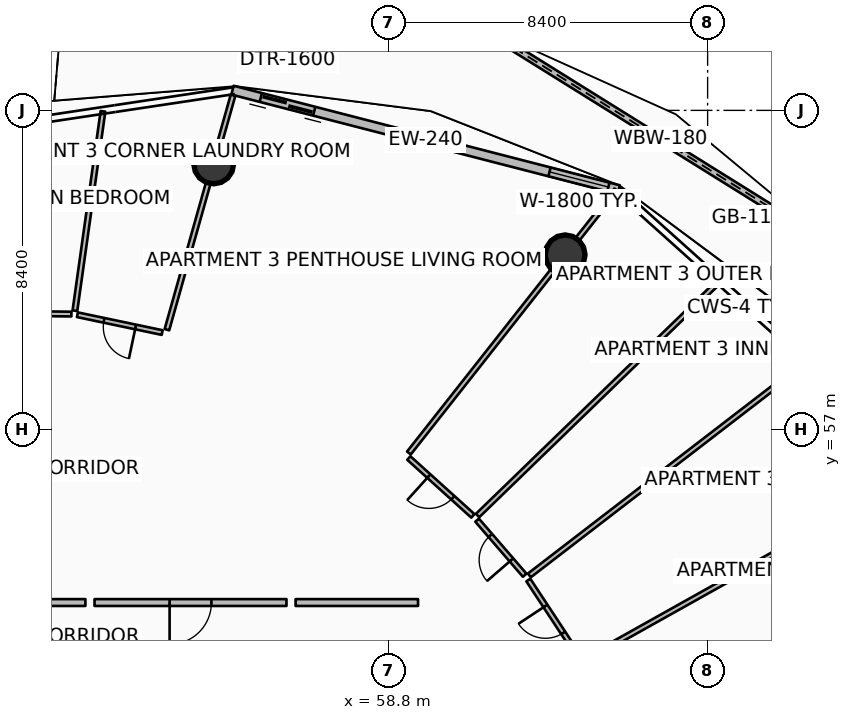
"""IFC4 building model, lengths in metres.
Left out: names, types, materials, properties, quantities, classifications, styles, units other than length and angle.
Written with IfcOpenShell. Run it as: python <this file> out.ifc"""

import sys

from ifc_helpers import new_model, si_unit, direction, frame, frame_2d, origin, origin_2d, place, context, subcontext, project, spatial, polyline, rectangle, circle, outline, extrude, element, fill, save


model = new_model("IFC4")
c1 = context("Model", 3, precision=1e-05, world=origin(), true_north=direction((0.0, 1.0)))
c2 = subcontext(c1, "Body", "Model", "MODEL_VIEW")
j1 = project(units=[si_unit("LENGTHUNIT", "METRE"), si_unit("PLANEANGLEUNIT", "RADIAN")], contexts=[c1])
p1 = place(None, origin())
s1 = spatial("IfcSite", under=j1, at=p1, CompositionType="ELEMENT")
p2 = place(p1, origin())
s2 = spatial("IfcBuilding", under=s1, at=p2, CompositionType="ELEMENT")
p3 = place(p2, frame((0.0, 0.0, 221.55)))
s3 = spatial("IfcBuildingStorey", under=s2, at=p3, CompositionType="ELEMENT", Elevation=221.55)
p4 = place(p3, frame((63.451, 61.599, 0.0), z_axis=(0.178277097361, 0.226248863544, 0.957616169612), x_axis=(-0.785457214564, 0.618915958826, 0.0)))
e1 = element("IfcColumn", 1, at=p4, inside=s3, PredefinedType="COLUMN", context=c2, shape_type="SweptSolid", body=[
    extrude(circle(Radius=0.525, at=origin_2d()), origin(), (0.0, 0.0, 1.0), 3.624),
])
p5 = place(p3, frame((54.202, 63.992, 0.0), z_axis=(0.072038916576, 0.255527870756, 0.964114050186), x_axis=(-0.962482190553, 0.271344859667, 0.0)))
e2 = element("IfcColumn", 2, at=p5, inside=s3, PredefinedType="COLUMN", context=c2, shape_type="SweptSolid", body=[
    extrude(circle(Radius=0.525, at=origin_2d()), origin(), (0.0, 0.0, 1.0), 3.599),
])
p6 = place(p3, frame((70.74, 61.664, 0.0), z_axis=(0.0, 0.0, 1.0), x_axis=(-0.84875531388, 0.528785795158, 0.0)))
e3 = element("IfcWall", 3, at=p6, inside=s3, PredefinedType="PARAPET", context=c2, shape_type="SweptSolid", body=[
    extrude(outline(polyline([(0.0, 0.0), (11.257, 0.0), (11.257, 1.832), (5.628, 1.696), (0.0, 1.497), (0.0, 0.0)])), frame((0.0, 0.09, 0.0), z_axis=(0.0, -1.0, 0.0), x_axis=(1.0, 0.0, 0.0)), (0.0, 0.0, 1.0), 0.18),
])
p7 = place(p3, frame((64.86, 63.313, 0.0), z_axis=(0.0, 0.0, 1.0), x_axis=(-0.968374028006, 0.249502989727, 0.0)))
e4 = element("IfcWall", 4, at=p7, inside=s3, PredefinedType="SOLIDWALL", context=c2, shape_type="SweptSolid", body=[
    extrude(rectangle(XDim=10.494, YDim=0.24, at=frame_2d((5.247, 0.0))), origin(), (0.0, 0.0, 1.0), 2.42),
])
p8 = place(p7, frame((8.274, 0.0, 0.0)))
e5 = element("IfcOpeningElement", 5, at=p8, cuts=e4, PredefinedType="OPENING", context=c2, shape_type="SweptSolid", body=[
    extrude(rectangle(XDim=1.45, YDim=2.15, at=frame_2d((0.725, 1.075))), frame((0.0, 0.13, 0.0), z_axis=(0.0, -1.0, 0.0), x_axis=(1.0, 0.0, 0.0)), (0.0, 0.0, 1.0), 0.26),
])
p9 = place(p7, frame((0.28, 0.0, 0.65)))
e6 = element("IfcOpeningElement", 6, at=p9, cuts=e4, PredefinedType="OPENING", context=c2, shape_type="SweptSolid", body=[
    extrude(rectangle(XDim=1.6, YDim=1.5, at=frame_2d((0.8, 0.75))), frame((0.0, 0.13, 0.0), z_axis=(0.0, -1.0, 0.0), x_axis=(1.0, 0.0, 0.0)), (0.0, 0.0, 1.0), 0.26),
])
p10 = place(p3, frame((56.118, 52.45, 0.0), z_axis=(0.0, 0.0, 1.0), x_axis=(-1.0, 0.0, 0.0)))
e7 = element("IfcWall", 7, at=p10, inside=s3, PredefinedType="PARTITIONING", context=c2, shape_type="SweptSolid", body=[
    extrude(rectangle(XDim=5.051, YDim=0.18, at=frame_2d((2.525, 0.0))), origin(), (0.0, 0.0, 1.0), 2.427),
])
p11 = place(p10, frame((1.975, 0.0, 0.0)))
e8 = element("IfcOpeningElement", 8, at=p11, cuts=e7, PredefinedType="OPENING", context=c2, shape_type="SweptSolid", body=[
    extrude(rectangle(XDim=1.1, YDim=2.1, at=frame_2d((0.55, 1.05))), frame((0.0, 0.1, 0.0), z_axis=(0.0, -1.0, 0.0), x_axis=(1.0, 0.0, 0.0)), (0.0, 0.0, 1.0), 0.2),
])
p12 = place(p3, frame((65.019, 48.746, 0.0), z_axis=(0.0, 0.0, 1.0), x_axis=(0.929640612561, 0.368467544672, 0.0)))
e9 = element("IfcWall", 9, at=p12, inside=s3, PredefinedType="PARTITIONING", context=c2, shape_type="SweptSolid", body=[
    extrude(rectangle(XDim=9.106, YDim=0.125, at=frame_2d((4.553, 0.0))), origin(), (0.0, 0.0, 1.0), 2.445),
])
p13 = place(p3, frame((59.58, 52.45, 0.0), z_axis=(0.0, 0.0, 1.0), x_axis=(-1.0, 0.0, 0.0)))
e10 = element("IfcWall", 10, at=p13, inside=s3, PredefinedType="PARTITIONING", context=c2, shape_type="SweptSolid", body=[
    extrude(rectangle(XDim=3.222, YDim=0.18, at=frame_2d((1.611, 0.0))), origin(), (0.0, 0.0, 1.0), 2.427),
])
p14 = place(p3, frame((63.981, 50.95, 0.0), z_axis=(0.0, 0.0, 1.0), x_axis=(0.872503842663, 0.488607249781, 0.0)))
e11 = element("IfcWall", 11, at=p14, inside=s3, PredefinedType="PARTITIONING", context=c2, shape_type="SweptSolid", body=[
    extrude(rectangle(XDim=9.578, YDim=0.125, at=frame_2d((4.789, 0.0))), origin(), (0.0, 0.0, 1.0), 2.427),
])
p15 = place(p3, frame((59.34, 56.385, 0.0), z_axis=(0.0, 0.0, 1.0), x_axis=(0.619088176329, 0.785321481897, 0.0)))
e12 = element("IfcWall", 12, at=p15, inside=s3, PredefinedType="PARTITIONING", context=c2, shape_type="SweptSolid", body=[
    extrude(rectangle(XDim=8.813, YDim=0.125, at=frame_2d((4.407, 0.0))), origin(), (0.0, 0.0, 1.0), 2.427),
])
p16 = place(p3, frame((62.509, 53.164, 0.0), z_axis=(0.0, 0.0, 1.0), x_axis=(0.792555170496, 0.609800214595, 0.0)))
e13 = element("IfcWall", 13, at=p16, inside=s3, PredefinedType="PARTITIONING", context=c2, shape_type="SweptSolid", body=[
    extrude(rectangle(XDim=9.232, YDim=0.125, at=frame_2d((4.616, 0.0))), origin(), (0.0, 0.0, 1.0), 2.445),
])
p17 = place(p3, frame((61.147, 54.74, 0.0), z_axis=(0.0, 0.0, 1.0), x_axis=(0.718115054564, 0.695924398487, 0.0)))
e14 = element("IfcWall", 14, at=p17, inside=s3, PredefinedType="PARTITIONING", context=c2, shape_type="SweptSolid", body=[
    extrude(rectangle(XDim=8.834, YDim=0.125, at=frame_2d((4.417, 0.0))), origin(), (0.0, 0.0, 1.0), 2.445),
])
p18 = place(p3, frame((63.85, 50.968, 0.0), z_axis=(0.0, 0.0, 1.0), x_axis=(-0.550588918003, 0.834776523012, 0.0)))
e15 = element("IfcWall", 15, at=p18, inside=s3, PredefinedType="PARTITIONING", context=c2, shape_type="SweptSolid", body=[
    extrude(rectangle(XDim=2.484, YDim=0.125, at=frame_2d((1.242, 0.0))), origin(), (0.0, 0.0, 1.0), 2.427),
])
p19 = place(p18, frame((0.817, 0.0, 0.0)))
e16 = element("IfcOpeningElement", 16, at=p19, cuts=e15, PredefinedType="OPENING", context=c2, shape_type="SweptSolid", body=[
    extrude(rectangle(XDim=0.85, YDim=2.06, at=frame_2d((0.425, 1.03))), frame((0.0, 0.073, 0.0), z_axis=(0.0, -1.0, 0.0), x_axis=(1.0, 0.0, 0.0)), (0.0, 0.0, 1.0), 0.145),
])
p20 = place(p3, frame((62.386, 53.169, 0.0), z_axis=(0.0, 0.0, 1.0), x_axis=(-0.653885574284, 0.756593454732, 0.0)))
e17 = element("IfcWall", 17, at=p20, inside=s3, PredefinedType="PARTITIONING", context=c2, shape_type="SweptSolid", body=[
    extrude(rectangle(XDim=1.914, YDim=0.125, at=frame_2d((0.957, 0.0))), origin(), (0.0, 0.0, 1.0), 2.91),
])
p21 = place(p20, frame((0.532, 0.0, 0.0)))
e18 = element("IfcOpeningElement", 18, at=p21, cuts=e17, PredefinedType="OPENING", context=c2, shape_type="SweptSolid", body=[
    extrude(rectangle(XDim=0.85, YDim=2.06, at=frame_2d((0.425, 1.03))), frame((0.0, 0.073, 0.0), z_axis=(0.0, -1.0, 0.0), x_axis=(1.0, 0.0, 0.0)), (0.0, 0.0, 1.0), 0.145),
])
p22 = place(p3, frame((61.023, 54.731, 0.0), z_axis=(0.0, 0.0, 1.0), x_axis=(-0.742261355739, 0.670110498184, 0.0)))
e19 = element("IfcWall", 19, at=p22, inside=s3, PredefinedType="PARTITIONING", context=c2, shape_type="SweptSolid", body=[
    extrude(rectangle(XDim=2.271, YDim=0.125, at=frame_2d((1.135, 0.0))), origin(), (0.0, 0.0, 1.0), 2.427),
])
p23 = place(p22, frame((0.71, 0.0, 0.0)))
e20 = element("IfcOpeningElement", 20, at=p23, cuts=e19, PredefinedType="OPENING", context=c2, shape_type="SweptSolid", body=[
    extrude(rectangle(XDim=0.85, YDim=2.06, at=frame_2d((0.425, 1.03))), frame((0.0, 0.073, 0.0), z_axis=(0.0, -1.0, 0.0), x_axis=(1.0, 0.0, 0.0)), (0.0, 0.0, 1.0), 0.145),
])
p24 = place(p3, frame((50.827, 52.45, 0.0), z_axis=(0.0, 0.0, 1.0), x_axis=(-1.0, 0.0, 0.0)))
e21 = element("IfcWall", 21, at=p24, inside=s3, PredefinedType="PARTITIONING", context=c2, shape_type="SweptSolid", body=[
    extrude(rectangle(XDim=3.944, YDim=0.18, at=frame_2d((1.972, 0.0))), origin(), (0.0, 0.0, 1.0), 2.427),
])
p25 = place(p3, frame((52.972, 59.629, 0.0), z_axis=(0.0, 0.0, 1.0), x_axis=(0.271444786447, 0.962454013401, 0.0)))
e22 = element("IfcWall", 22, at=p25, inside=s3, PredefinedType="PARTITIONING", context=c2, shape_type="SweptSolid", body=[
    extrude(rectangle(XDim=6.41, YDim=0.125, at=frame_2d((3.205, 0.0))), origin(), (0.0, 0.0, 1.0), 2.427),
])
p26 = place(p3, frame((50.551, 60.128, 0.0), z_axis=(0.0, 0.0, 1.0), x_axis=(0.139350148753, 0.990243170157, 0.0)))
e23 = element("IfcWall", 23, at=p26, inside=s3, PredefinedType="PARTITIONING", context=c2, shape_type="SweptSolid", body=[
    extrude(rectangle(XDim=5.298, YDim=0.125, at=frame_2d((2.649, 0.0))), origin(), (0.0, 0.0, 1.0), 2.445),
])
p27 = place(p3, frame((52.847, 59.554, 0.0), z_axis=(0.0, 0.0, 1.0), x_axis=(-0.978596361198, 0.205789119853, 0.0)))
e24 = element("IfcWall", 24, at=p27, inside=s3, PredefinedType="PARTITIONING", context=c2, shape_type="SweptSolid", body=[
    extrude(rectangle(XDim=2.279, YDim=0.125, at=frame_2d((1.14, 0.0))), origin(), (0.0, 0.0, 1.0), 2.427),
])
p28 = place(p27, frame((0.715, 0.0, 0.0)))
e25 = element("IfcOpeningElement", 25, at=p28, cuts=e24, PredefinedType="OPENING", context=c2, shape_type="SweptSolid", body=[
    extrude(rectangle(XDim=0.85, YDim=2.06, at=frame_2d((0.425, 1.03))), frame((0.0, 0.073, 0.0), z_axis=(0.0, -1.0, 0.0), x_axis=(1.0, 0.0, 0.0)), (0.0, 0.0, 1.0), 0.145),
])
p29 = place(p3, frame((50.458, 60.04, 0.0), z_axis=(0.0, 0.0, 1.0), x_axis=(-0.999939946846, 0.010959137826, 0.0)))
e26 = element("IfcWall", 26, at=p29, inside=s3, PredefinedType="PARTITIONING", context=c2, shape_type="SweptSolid", body=[
    extrude(rectangle(XDim=4.5, YDim=0.125, at=frame_2d((2.25, 0.0))), origin(), (0.0, 0.0, 1.0), 2.427),
])
p30 = place(p29, frame((1.8, 0.0, 0.0)))
e27 = element("IfcOpeningElement", 27, at=p30, cuts=e26, PredefinedType="OPENING", context=c2, shape_type="SweptSolid", body=[
    extrude(rectangle(XDim=0.9, YDim=2.08, at=frame_2d((0.45, 1.04))), frame((0.0, 0.073, 0.0), z_axis=(0.0, -1.0, 0.0), x_axis=(1.0, 0.0, 0.0)), (0.0, 0.0, 1.0), 0.145),
])
p31 = place(p8, origin())
e28 = element("IfcDoor", 28, at=p31, inside=s3, OperationType="DOUBLE_DOOR_SLIDING", PredefinedType="DOOR", context=c2, shape_type="SweptSolid", body=[
    extrude(rectangle(XDim=1.45, YDim=2.15, at=frame_2d((0.725, 1.075))), frame((0.0, 0.025, 0.0), z_axis=(0.0, -1.0, 0.0), x_axis=(1.0, 0.0, 0.0)), (0.0, 0.0, 1.0), 0.05),
])
fill(e5, e28)
p32 = place(p9, origin())
e29 = element("IfcWindow", 29, at=p32, inside=s3, PartitioningType="SINGLE_PANEL", PredefinedType="WINDOW", context=c2, shape_type="SweptSolid", body=[
    extrude(rectangle(XDim=1.6, YDim=1.5, at=frame_2d((0.8, 0.75))), frame((0.0, 0.03, 0.0), z_axis=(0.0, -1.0, 0.0), x_axis=(1.0, 0.0, 0.0)), (0.0, 0.0, 1.0), 0.06),
])
fill(e6, e29)
p33 = place(p11, origin())
e30 = element("IfcDoor", 30, at=p33, inside=s3, OperationType="SINGLE_SWING_RIGHT", PredefinedType="DOOR", context=c2, shape_type="SweptSolid", body=[
    extrude(rectangle(XDim=1.1, YDim=2.1, at=frame_2d((0.55, 1.05))), frame((0.0, 0.025, 0.0), z_axis=(0.0, -1.0, 0.0), x_axis=(1.0, 0.0, 0.0)), (0.0, 0.0, 1.0), 0.05),
])
fill(e8, e30)
p34 = place(p19, origin())
e31 = element("IfcDoor", 31, at=p34, inside=s3, OperationType="SINGLE_SWING_RIGHT", PredefinedType="DOOR", context=c2, shape_type="SweptSolid", body=[
    extrude(rectangle(XDim=0.85, YDim=2.06, at=frame_2d((0.425, 1.03))), frame((0.0, 0.025, 0.0), z_axis=(0.0, -1.0, 0.0), x_axis=(1.0, 0.0, 0.0)), (0.0, 0.0, 1.0), 0.05),
])
fill(e16, e31)
p35 = place(p21, origin())
e32 = element("IfcDoor", 32, at=p35, inside=s3, OperationType="SINGLE_SWING_LEFT", PredefinedType="DOOR", context=c2, shape_type="SweptSolid", body=[
    extrude(rectangle(XDim=0.85, YDim=2.06, at=frame_2d((0.425, 1.03))), frame((0.0, 0.025, 0.0), z_axis=(0.0, -1.0, 0.0), x_axis=(1.0, 0.0, 0.0)), (0.0, 0.0, 1.0), 0.05),
])
fill(e18, e32)
p36 = place(p23, origin())
e33 = element("IfcDoor", 33, at=p36, inside=s3, OperationType="SINGLE_SWING_RIGHT", PredefinedType="DOOR", context=c2, shape_type="SweptSolid", body=[
    extrude(rectangle(XDim=0.85, YDim=2.06, at=frame_2d((0.425, 1.03))), frame((0.0, 0.025, 0.0), z_axis=(0.0, -1.0, 0.0), x_axis=(1.0, 0.0, 0.0)), (0.0, 0.0, 1.0), 0.05),
])
fill(e20, e33)
p37 = place(p28, origin())
e34 = element("IfcDoor", 34, at=p37, inside=s3, OperationType="SINGLE_SWING_LEFT", PredefinedType="DOOR", context=c2, shape_type="SweptSolid", body=[
    extrude(rectangle(XDim=0.85, YDim=2.06, at=frame_2d((0.425, 1.03))), frame((0.0, 0.025, 0.0), z_axis=(0.0, -1.0, 0.0), x_axis=(1.0, 0.0, 0.0)), (0.0, 0.0, 1.0), 0.05),
])
fill(e25, e34)
save(model, sys.argv[1])
